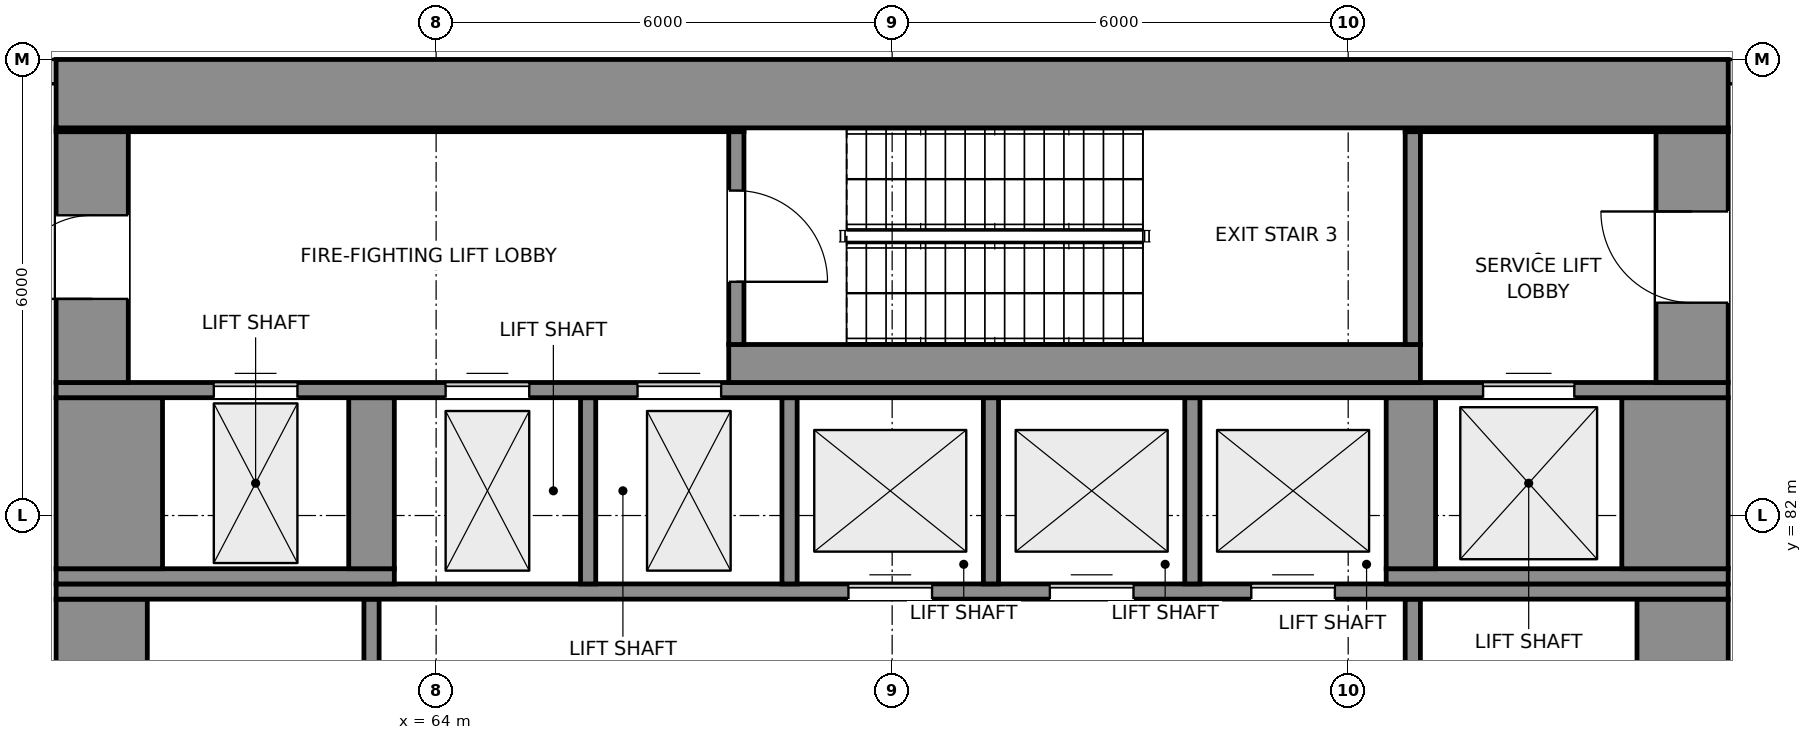
"""IFC4 building model, lengths in metres.
Left out: names, types, materials, properties, quantities, classifications, styles, units other than length and angle.
Written with IfcOpenShell. Run it as: python <this file> out.ifc"""

import sys

from ifc_helpers import new_model, si_unit, direction, frame, frame_2d, origin, place, context, subcontext, project, spatial, rectangle, extrude, element, fill, save


model = new_model("IFC4")
c1 = context("Model", 3, precision=1e-05, world=origin(), true_north=direction((0.0, 1.0)))
c2 = subcontext(c1, "Body", "Model", "MODEL_VIEW")
j1 = project(units=[si_unit("LENGTHUNIT", "METRE"), si_unit("PLANEANGLEUNIT", "RADIAN")], contexts=[c1])
p1 = place(None, origin())
s1 = spatial("IfcSite", under=j1, at=p1, CompositionType="ELEMENT")
p2 = place(p1, origin())
s2 = spatial("IfcBuilding", under=s1, at=p2, CompositionType="ELEMENT")
p3 = place(p2, frame((0.0, 0.0, 142.6)))
s3 = spatial("IfcBuildingStorey", under=s2, at=p3, CompositionType="ELEMENT", Elevation=142.6)
for number, where, z_axis, x_axis in (
    (1, (81.385, 87.84, 0.0), (0.0, 0.0, 1.0), (-1.0, 0.0, 0.0)),
    (2, (59.0, 87.84, 0.0), (0.0, 0.0, 1.0), (-1.0, 0.0, 0.0)),
):
    element("IfcWall", number, at=place(p3, frame(where, z_axis=z_axis, x_axis=x_axis)), inside=s3, PredefinedType="SOLIDWALL", context=c2, shape_type="SweptSolid", body=[
        extrude(rectangle(XDim=0.385, YDim=0.32, at=frame_2d((0.192, 0.0))), origin(), (0.0, 0.0, 1.0), 5.7),
    ])
for number, where, z_axis, x_axis in (
    (3, (59.6, 71.95, 0.0), (0.0, 0.0, 1.0), (0.0, 1.0, 0.0)),
    (4, (80.4, 71.95, 0.0), (0.0, 0.0, 1.0), (0.0, 1.0, 0.0)),
):
    element("IfcWall", number, at=place(p3, frame(where, z_axis=z_axis, x_axis=x_axis)), inside=s3, PredefinedType="SHEAR", context=c2, shape_type="SweptSolid", body=[
        extrude(rectangle(XDim=8.95, YDim=1.2, at=frame_2d((4.475, 0.0))), origin(), (0.0, 0.0, 1.0), 6.0),
    ])
for number, where, z_axis, x_axis in (
    (5, (63.15, 77.7, 0.0), (0.0, 0.0, 1.0), (0.0, 1.0, 0.0)),
    (6, (76.85, 77.7, 0.0), (0.0, 0.0, 1.0), (0.0, 1.0, 0.0)),
):
    element("IfcWall", number, at=place(p3, frame(where, z_axis=z_axis, x_axis=x_axis)), inside=s3, PredefinedType="SHEAR", context=c2, shape_type="SweptSolid", body=[
        extrude(rectangle(XDim=3.2, YDim=0.2, at=frame_2d((1.6, 0.0))), origin(), (0.0, 0.0, 1.0), 6.0),
    ])
p4 = place(p3, frame((59.0, 81.0, 0.0), z_axis=(0.0, 0.0, 1.0), x_axis=(1.0, 0.0, 0.0)))
e7 = element("IfcWall", 7, at=p4, inside=s3, PredefinedType="SHEAR", context=c2, shape_type="SweptSolid", body=[
    extrude(rectangle(XDim=22.0, YDim=0.2, at=frame_2d((11.0, 0.0))), origin(), (0.0, 0.0, 1.0), 6.0),
])
p5 = place(p4, frame((10.425, 0.0, 0.0)))
e8 = element("IfcOpeningElement", 8, at=p5, cuts=e7, PredefinedType="OPENING", context=c2, shape_type="SweptSolid", body=[
    extrude(rectangle(XDim=1.1, YDim=2.1, at=frame_2d((0.55, 1.05))), frame((0.0, 0.11, 0.0), z_axis=(0.0, -1.0, 0.0), x_axis=(1.0, 0.0, 0.0)), (0.0, 0.0, 1.0), 0.22),
])
p6 = place(p4, frame((13.075, 0.0, 0.0)))
e9 = element("IfcOpeningElement", 9, at=p6, cuts=e7, PredefinedType="OPENING", context=c2, shape_type="SweptSolid", body=[
    extrude(rectangle(XDim=1.1, YDim=2.1, at=frame_2d((0.55, 1.05))), frame((0.0, 0.11, 0.0), z_axis=(0.0, -1.0, 0.0), x_axis=(1.0, 0.0, 0.0)), (0.0, 0.0, 1.0), 0.22),
])
p7 = place(p4, frame((15.725, 0.0, 0.0)))
e10 = element("IfcOpeningElement", 10, at=p7, cuts=e7, PredefinedType="OPENING", context=c2, shape_type="SweptSolid", body=[
    extrude(rectangle(XDim=1.1, YDim=2.1, at=frame_2d((0.55, 1.05))), frame((0.0, 0.11, 0.0), z_axis=(0.0, -1.0, 0.0), x_axis=(1.0, 0.0, 0.0)), (0.0, 0.0, 1.0), 0.22),
])
p8 = place(p3, frame((59.0, 81.2, 0.0), z_axis=(0.0, 0.0, 1.0), x_axis=(1.0, 0.0, 0.0)))
e11 = element("IfcWall", 11, at=p8, inside=s3, PredefinedType="SHEAR", context=c2, shape_type="SweptSolid", body=[
    extrude(rectangle(XDim=4.45, YDim=0.2, at=frame_2d((2.225, 0.0))), origin(), (0.0, 0.0, 1.0), 6.0),
])
for number, where, z_axis, x_axis in (
    (12, (66.0, 81.1, 0.0), (0.0, 0.0, 1.0), (0.0, 1.0, 0.0)),
    (13, (68.65, 81.1, 0.0), (0.0, 0.0, 1.0), (0.0, 1.0, 0.0)),
    (14, (71.3, 81.1, 0.0), (0.0, 0.0, 1.0), (0.0, 1.0, 0.0)),
    (15, (73.95, 81.1, 0.0), (0.0, 0.0, 1.0), (0.0, 1.0, 0.0)),
):
    element("IfcWall", number, at=place(p3, frame(where, z_axis=z_axis, x_axis=x_axis)), inside=s3, PredefinedType="SHEAR", context=c2, shape_type="SweptSolid", body=[
        extrude(rectangle(XDim=2.45, YDim=0.2, at=frame_2d((1.225, 0.0))), origin(), (0.0, 0.0, 1.0), 6.0),
    ])
p9 = place(p3, frame((76.5, 81.2, 0.0), z_axis=(0.0, 0.0, 1.0), x_axis=(1.0, 0.0, 0.0)))
e16 = element("IfcWall", 16, at=p9, inside=s3, PredefinedType="SHEAR", context=c2, shape_type="SweptSolid", body=[
    extrude(rectangle(XDim=4.5, YDim=0.2, at=frame_2d((2.25, 0.0))), origin(), (0.0, 0.0, 1.0), 6.0),
])
p10 = place(p3, frame((59.7, 81.3, 0.0), z_axis=(0.0, 0.0, 1.0), x_axis=(0.0, 1.0, 0.0)))
e17 = element("IfcWall", 17, at=p10, inside=s3, PredefinedType="SHEAR", context=c2, shape_type="SweptSolid", body=[
    extrude(rectangle(XDim=2.25, YDim=1.4, at=frame_2d((1.125, 0.0))), origin(), (0.0, 0.0, 1.0), 6.0),
])
p11 = place(p3, frame((63.15, 81.3, 0.0), z_axis=(0.0, 0.0, 1.0), x_axis=(0.0, 1.0, 0.0)))
e18 = element("IfcWall", 18, at=p11, inside=s3, PredefinedType="SHEAR", context=c2, shape_type="SweptSolid", body=[
    extrude(rectangle(XDim=2.25, YDim=0.6, at=frame_2d((1.125, 0.0))), origin(), (0.0, 0.0, 1.0), 6.0),
])
p12 = place(p3, frame((76.825, 81.3, 0.0), z_axis=(0.0, 0.0, 1.0), x_axis=(0.0, 1.0, 0.0)))
e19 = element("IfcWall", 19, at=p12, inside=s3, PredefinedType="SHEAR", context=c2, shape_type="SweptSolid", body=[
    extrude(rectangle(XDim=2.25, YDim=0.65, at=frame_2d((1.125, 0.0))), origin(), (0.0, 0.0, 1.0), 6.0),
])
p13 = place(p3, frame((80.3, 81.3, 0.0), z_axis=(0.0, 0.0, 1.0), x_axis=(0.0, 1.0, 0.0)))
e20 = element("IfcWall", 20, at=p13, inside=s3, PredefinedType="SHEAR", context=c2, shape_type="SweptSolid", body=[
    extrude(rectangle(XDim=2.25, YDim=1.4, at=frame_2d((1.125, 0.0))), origin(), (0.0, 0.0, 1.0), 6.0),
])
p14 = place(p3, frame((59.0, 83.65, 0.0), z_axis=(0.0, 0.0, 1.0), x_axis=(1.0, 0.0, 0.0)))
e21 = element("IfcWall", 21, at=p14, inside=s3, PredefinedType="SHEAR", context=c2, shape_type="SweptSolid", body=[
    extrude(rectangle(XDim=22.0, YDim=0.2, at=frame_2d((11.0, 0.0))), origin(), (0.0, 0.0, 1.0), 6.0),
])
p15 = place(p14, frame((5.125, 0.0, 0.0)))
e22 = element("IfcOpeningElement", 22, at=p15, cuts=e21, PredefinedType="OPENING", context=c2, shape_type="SweptSolid", body=[
    extrude(rectangle(XDim=1.1, YDim=2.1, at=frame_2d((0.55, 1.05))), frame((0.0, 0.11, 0.0), z_axis=(0.0, -1.0, 0.0), x_axis=(1.0, 0.0, 0.0)), (0.0, 0.0, 1.0), 0.22),
])
p16 = place(p14, frame((7.65, 0.0, 0.0)))
e23 = element("IfcOpeningElement", 23, at=p16, cuts=e21, PredefinedType="OPENING", context=c2, shape_type="SweptSolid", body=[
    extrude(rectangle(XDim=1.1, YDim=2.1, at=frame_2d((0.55, 1.05))), frame((0.0, 0.11, 0.0), z_axis=(0.0, -1.0, 0.0), x_axis=(1.0, 0.0, 0.0)), (0.0, 0.0, 1.0), 0.22),
])
p17 = place(p14, frame((18.775, 0.0, 0.0)))
e24 = element("IfcOpeningElement", 24, at=p17, cuts=e21, PredefinedType="OPENING", context=c2, shape_type="SweptSolid", body=[
    extrude(rectangle(XDim=1.2, YDim=2.1, at=frame_2d((0.6, 1.05))), frame((0.0, 0.11, 0.0), z_axis=(0.0, -1.0, 0.0), x_axis=(1.0, 0.0, 0.0)), (0.0, 0.0, 1.0), 0.22),
])
p18 = place(p14, frame((2.075, 0.0, 0.0)))
e25 = element("IfcOpeningElement", 25, at=p18, cuts=e21, PredefinedType="OPENING", context=c2, shape_type="SweptSolid", body=[
    extrude(rectangle(XDim=1.1, YDim=2.1, at=frame_2d((0.55, 1.05))), frame((0.0, 0.11, 0.0), z_axis=(0.0, -1.0, 0.0), x_axis=(1.0, 0.0, 0.0)), (0.0, 0.0, 1.0), 0.22),
])
p19 = place(p3, frame((59.475, 83.75, 0.0), z_axis=(0.0, 0.0, 1.0), x_axis=(0.0, 1.0, 0.0)))
e26 = element("IfcWall", 26, at=p19, inside=s3, PredefinedType="SHEAR", context=c2, shape_type="SweptSolid", body=[
    extrude(rectangle(XDim=3.3, YDim=0.95, at=frame_2d((1.65, 0.0))), origin(), (0.0, 0.0, 1.0), 6.0),
])
p20 = place(p19, frame((1.1, 0.0, 0.0)))
e27 = element("IfcOpeningElement", 27, at=p20, cuts=e26, PredefinedType="OPENING", context=c2, shape_type="SweptSolid", body=[
    extrude(rectangle(XDim=1.1, YDim=2.1, at=frame_2d((0.55, 1.05))), frame((0.0, 0.485, 0.0), z_axis=(0.0, -1.0, 0.0), x_axis=(1.0, 0.0, 0.0)), (0.0, 0.0, 1.0), 0.97),
])
p21 = place(p3, frame((67.85, 84.0, 0.0), z_axis=(0.0, 0.0, 1.0), x_axis=(1.0, 0.0, 0.0)))
e28 = element("IfcWall", 28, at=p21, inside=s3, PredefinedType="SHEAR", context=c2, shape_type="SweptSolid", body=[
    extrude(rectangle(XDim=9.1, YDim=0.5, at=frame_2d((4.55, 0.0))), origin(), (0.0, 0.0, 1.0), 6.0),
])
p22 = place(p3, frame((80.525, 83.75, 0.0), z_axis=(0.0, 0.0, 1.0), x_axis=(0.0, 1.0, 0.0)))
e29 = element("IfcWall", 29, at=p22, inside=s3, PredefinedType="SHEAR", context=c2, shape_type="SweptSolid", body=[
    extrude(rectangle(XDim=3.3, YDim=0.95, at=frame_2d((1.65, 0.0))), origin(), (0.0, 0.0, 1.0), 6.0),
])
p23 = place(p22, frame((1.05, 0.0, 0.0)))
e30 = element("IfcOpeningElement", 30, at=p23, cuts=e29, PredefinedType="OPENING", context=c2, shape_type="SweptSolid", body=[
    extrude(rectangle(XDim=1.2, YDim=2.1, at=frame_2d((0.6, 1.05))), frame((0.0, 0.485, 0.0), z_axis=(0.0, -1.0, 0.0), x_axis=(1.0, 0.0, 0.0)), (0.0, 0.0, 1.0), 0.97),
])
p24 = place(p3, frame((67.95, 84.25, 0.0), z_axis=(0.0, 0.0, 1.0), x_axis=(0.0, 1.0, 0.0)))
e31 = element("IfcWall", 31, at=p24, inside=s3, PredefinedType="SHEAR", context=c2, shape_type="SweptSolid", body=[
    extrude(rectangle(XDim=2.8, YDim=0.2, at=frame_2d((1.4, 0.0))), origin(), (0.0, 0.0, 1.0), 6.0),
])
p25 = place(p24, frame((0.825, 0.0, 0.0)))
e32 = element("IfcOpeningElement", 32, at=p25, cuts=e31, PredefinedType="OPENING", context=c2, shape_type="SweptSolid", body=[
    extrude(rectangle(XDim=1.2, YDim=2.1, at=frame_2d((0.6, 1.05))), frame((0.0, 0.11, 0.0), z_axis=(0.0, -1.0, 0.0), x_axis=(1.0, 0.0, 0.0)), (0.0, 0.0, 1.0), 0.22),
])
p26 = place(p3, frame((76.85, 84.25, 0.0), z_axis=(0.0, 0.0, 1.0), x_axis=(0.0, 1.0, 0.0)))
e33 = element("IfcWall", 33, at=p26, inside=s3, PredefinedType="SHEAR", context=c2, shape_type="SweptSolid", body=[
    extrude(rectangle(XDim=2.8, YDim=0.2, at=frame_2d((1.4, 0.0))), origin(), (0.0, 0.0, 1.0), 6.0),
])
p27 = place(p3, frame((59.0, 87.075, 0.0), z_axis=(0.0, 0.0, 1.0), x_axis=(1.0, 0.0, 0.0)))
e34 = element("IfcWall", 34, at=p27, inside=s3, PredefinedType="SHEAR", context=c2, shape_type="SweptSolid", body=[
    extrude(rectangle(XDim=9.05, YDim=0.05, at=frame_2d((4.525, 0.0))), origin(), (0.0, 0.0, 1.0), 6.0),
])
p28 = place(p3, frame((76.75, 87.075, 0.0), z_axis=(0.0, 0.0, 1.0), x_axis=(1.0, 0.0, 0.0)))
e35 = element("IfcWall", 35, at=p28, inside=s3, PredefinedType="SHEAR", context=c2, shape_type="SweptSolid", body=[
    extrude(rectangle(XDim=4.25, YDim=0.05, at=frame_2d((2.125, 0.0))), origin(), (0.0, 0.0, 1.0), 6.0),
])
p29 = place(p3, frame((59.0, 87.55, 0.0), z_axis=(0.0, 0.0, 1.0), x_axis=(1.0, 0.0, 0.0)))
e36 = element("IfcWall", 36, at=p29, inside=s3, PredefinedType="SHEAR", context=c2, shape_type="SweptSolid", body=[
    extrude(rectangle(XDim=22.0, YDim=0.9, at=frame_2d((11.0, 0.0))), origin(), (0.0, 0.0, 1.0), 6.0),
])
p30 = place(p25, frame((1.2, 0.0, 0.0), z_axis=(0.0, 0.0, 1.0), x_axis=(-1.0, 0.0, 0.0)))
e37 = element("IfcDoor", 37, at=p30, inside=s3, OperationType="SINGLE_SWING_RIGHT", PredefinedType="DOOR", context=c2, shape_type="SweptSolid", body=[
    extrude(rectangle(XDim=1.2, YDim=2.1, at=frame_2d((0.6, 1.05))), frame((0.0, 0.025, 0.0), z_axis=(0.0, -1.0, 0.0), x_axis=(1.0, 0.0, 0.0)), (0.0, 0.0, 1.0), 0.05),
])
fill(e32, e37)
p31 = place(p20, origin())
e38 = element("IfcDoor", 38, at=p31, inside=s3, OperationType="SINGLE_SWING_LEFT", PredefinedType="DOOR", context=c2, shape_type="SweptSolid", body=[
    extrude(rectangle(XDim=1.1, YDim=2.1, at=frame_2d((0.55, 1.05))), frame((0.0, 0.025, 0.0), z_axis=(0.0, -1.0, 0.0), x_axis=(1.0, 0.0, 0.0)), (0.0, 0.0, 1.0), 0.05),
])
fill(e27, e38)
p32 = place(p23, origin())
e39 = element("IfcDoor", 39, at=p32, inside=s3, OperationType="SINGLE_SWING_RIGHT", PredefinedType="DOOR", context=c2, shape_type="SweptSolid", body=[
    extrude(rectangle(XDim=1.2, YDim=2.1, at=frame_2d((0.6, 1.05))), frame((0.0, 0.025, 0.0), z_axis=(0.0, -1.0, 0.0), x_axis=(1.0, 0.0, 0.0)), (0.0, 0.0, 1.0), 0.05),
])
fill(e30, e39)
p33 = place(p15, origin())
e40 = element("IfcDoor", 40, at=p33, inside=s3, OperationType="DOUBLE_DOOR_SLIDING", PredefinedType="DOOR", context=c2, shape_type="SweptSolid", body=[
    extrude(rectangle(XDim=1.1, YDim=2.1, at=frame_2d((0.55, 1.05))), frame((0.0, 0.025, 0.0), z_axis=(0.0, -1.0, 0.0), x_axis=(1.0, 0.0, 0.0)), (0.0, 0.0, 1.0), 0.05),
])
fill(e22, e40)
p34 = place(p16, origin())
e41 = element("IfcDoor", 41, at=p34, inside=s3, OperationType="DOUBLE_DOOR_SLIDING", PredefinedType="DOOR", context=c2, shape_type="SweptSolid", body=[
    extrude(rectangle(XDim=1.1, YDim=2.1, at=frame_2d((0.55, 1.05))), frame((0.0, 0.025, 0.0), z_axis=(0.0, -1.0, 0.0), x_axis=(1.0, 0.0, 0.0)), (0.0, 0.0, 1.0), 0.05),
])
fill(e23, e41)
p35 = place(p5, origin())
e42 = element("IfcDoor", 42, at=p35, inside=s3, OperationType="DOUBLE_DOOR_SLIDING", PredefinedType="DOOR", context=c2, shape_type="SweptSolid", body=[
    extrude(rectangle(XDim=1.1, YDim=2.1, at=frame_2d((0.55, 1.05))), frame((0.0, 0.025, 0.0), z_axis=(0.0, -1.0, 0.0), x_axis=(1.0, 0.0, 0.0)), (0.0, 0.0, 1.0), 0.05),
])
fill(e8, e42)
p36 = place(p6, origin())
e43 = element("IfcDoor", 43, at=p36, inside=s3, OperationType="DOUBLE_DOOR_SLIDING", PredefinedType="DOOR", context=c2, shape_type="SweptSolid", body=[
    extrude(rectangle(XDim=1.1, YDim=2.1, at=frame_2d((0.55, 1.05))), frame((0.0, 0.025, 0.0), z_axis=(0.0, -1.0, 0.0), x_axis=(1.0, 0.0, 0.0)), (0.0, 0.0, 1.0), 0.05),
])
fill(e9, e43)
p37 = place(p7, origin())
e44 = element("IfcDoor", 44, at=p37, inside=s3, OperationType="DOUBLE_DOOR_SLIDING", PredefinedType="DOOR", context=c2, shape_type="SweptSolid", body=[
    extrude(rectangle(XDim=1.1, YDim=2.1, at=frame_2d((0.55, 1.05))), frame((0.0, 0.025, 0.0), z_axis=(0.0, -1.0, 0.0), x_axis=(1.0, 0.0, 0.0)), (0.0, 0.0, 1.0), 0.05),
])
fill(e10, e44)
p38 = place(p17, origin())
e45 = element("IfcDoor", 45, at=p38, inside=s3, OperationType="DOUBLE_DOOR_SLIDING", PredefinedType="DOOR", context=c2, shape_type="SweptSolid", body=[
    extrude(rectangle(XDim=1.2, YDim=2.1, at=frame_2d((0.6, 1.05))), frame((0.0, 0.025, 0.0), z_axis=(0.0, -1.0, 0.0), x_axis=(1.0, 0.0, 0.0)), (0.0, 0.0, 1.0), 0.05),
])
fill(e24, e45)
p39 = place(p18, origin())
e46 = element("IfcDoor", 46, at=p39, inside=s3, OperationType="DOUBLE_DOOR_SLIDING", PredefinedType="DOOR", context=c2, shape_type="SweptSolid", body=[
    extrude(rectangle(XDim=1.1, YDim=2.1, at=frame_2d((0.55, 1.05))), frame((0.0, 0.025, 0.0), z_axis=(0.0, -1.0, 0.0), x_axis=(1.0, 0.0, 0.0)), (0.0, 0.0, 1.0), 0.05),
])
fill(e25, e46)
save(model, sys.argv[1])
